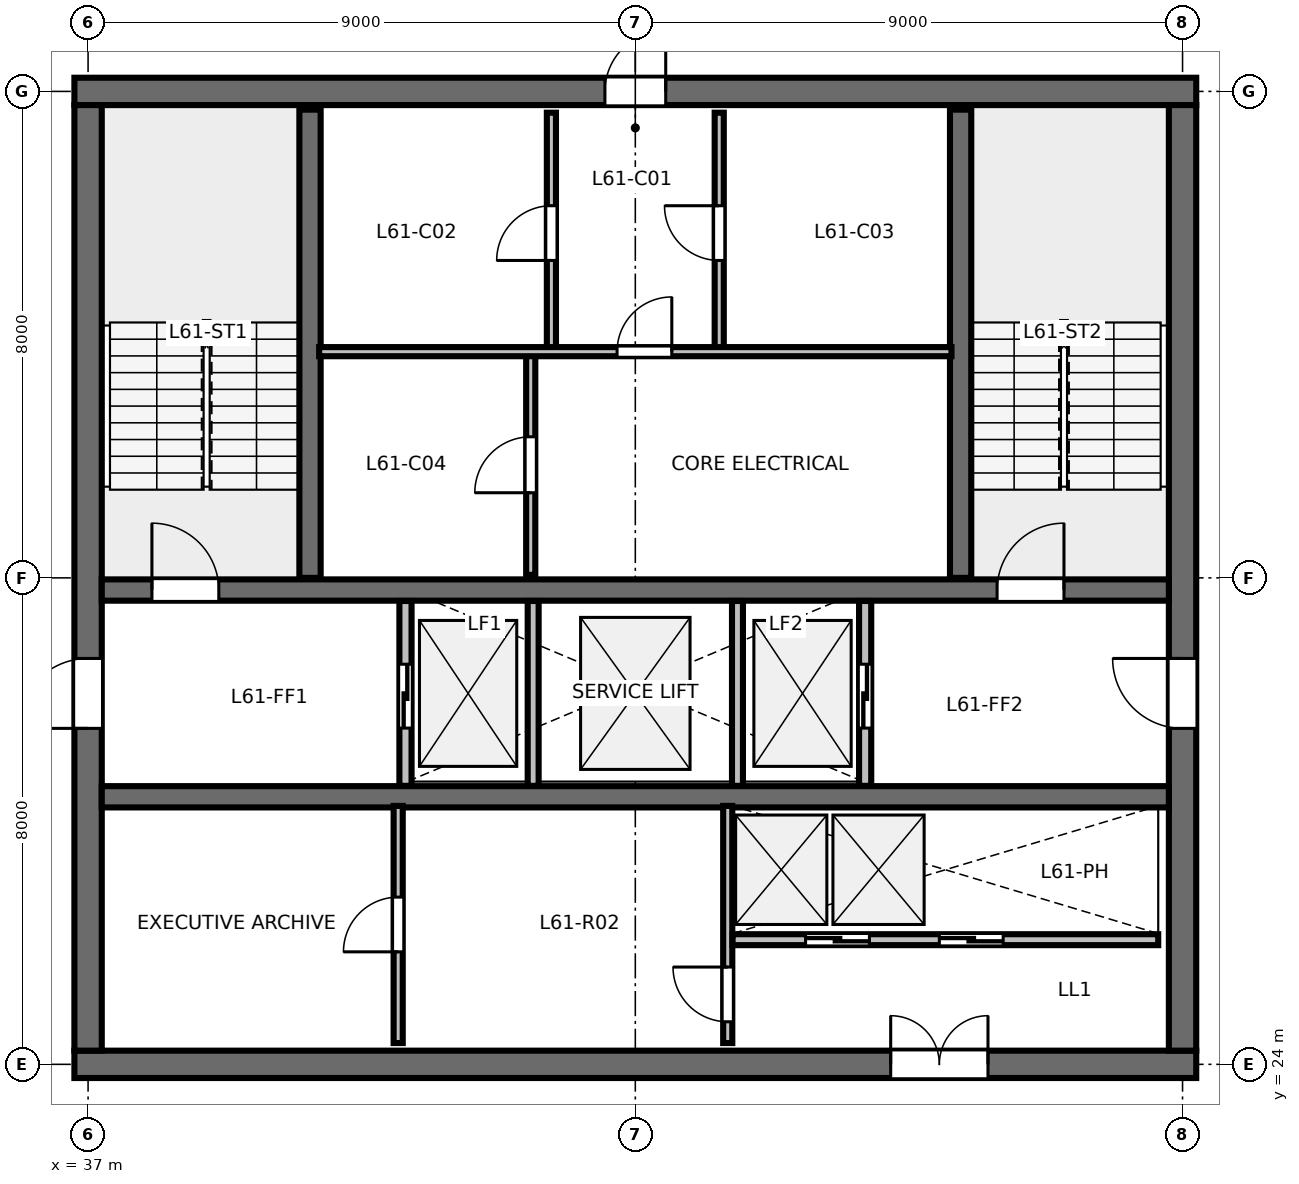
"""IFC4 building model, lengths in metres.
Left out: names, types, materials, properties, quantities, classifications, styles, units other than length and angle.
Written with IfcOpenShell. Run it as: python <this file> out.ifc"""

import sys

from ifc_helpers import new_model, si_unit, direction, frame, frame_2d, origin, place, context, subcontext, project, spatial, rectangle, extrude, element, fill, save


model = new_model("IFC4")
c1 = context("Model", 3, precision=1e-05, world=origin(), true_north=direction((0.0, 1.0)))
c2 = subcontext(c1, "Body", "Model", "MODEL_VIEW")
j1 = project(units=[si_unit("LENGTHUNIT", "METRE"), si_unit("PLANEANGLEUNIT", "RADIAN")], contexts=[c1])
p1 = place(None, origin())
s1 = spatial("IfcSite", under=j1, at=p1, CompositionType="ELEMENT")
p2 = place(p1, origin())
s2 = spatial("IfcBuilding", under=s1, at=p2, CompositionType="ELEMENT")
p3 = place(p2, frame((0.0, 0.0, 231.0)))
s3 = spatial("IfcBuildingStorey", under=s2, at=p3, CompositionType="ELEMENT", Elevation=231.0)
p4 = place(p3, frame((36.775, 24.0, 0.0), z_axis=(0.0, 0.0, 1.0), x_axis=(1.0, 0.0, 0.0)))
e1 = element("IfcWall", 1, at=p4, inside=s3, PredefinedType="SHEAR", context=c2, shape_type="SweptSolid", body=[
    extrude(rectangle(XDim=18.45, YDim=0.45, at=frame_2d((9.225, 0.0))), origin(), (0.0, 0.0, 1.0), 3.28),
])
p5 = place(p4, frame((13.425, 0.0, 0.0)))
e2 = element("IfcOpeningElement", 2, at=p5, cuts=e1, PredefinedType="OPENING", context=c2, shape_type="SweptSolid", body=[
    extrude(rectangle(XDim=1.6, YDim=2.15, at=frame_2d((0.8, 1.075))), frame((0.0, 0.235, 0.0), z_axis=(0.0, -1.0, 0.0), x_axis=(1.0, 0.0, 0.0)), (0.0, 0.0, 1.0), 0.47),
])
p6 = place(p3, frame((36.775, 40.0, 0.0), z_axis=(0.0, 0.0, 1.0), x_axis=(1.0, 0.0, 0.0)))
e3 = element("IfcWall", 3, at=p6, inside=s3, PredefinedType="SHEAR", context=c2, shape_type="SweptSolid", body=[
    extrude(rectangle(XDim=18.45, YDim=0.45, at=frame_2d((9.225, 0.0))), origin(), (0.0, 0.0, 1.0), 3.28),
])
p7 = place(p6, frame((8.725, 0.0, 0.0)))
e4 = element("IfcOpeningElement", 4, at=p7, cuts=e3, PredefinedType="OPENING", context=c2, shape_type="SweptSolid", body=[
    extrude(rectangle(XDim=1.0, YDim=2.15, at=frame_2d((0.5, 1.075))), frame((0.0, 0.235, 0.0), z_axis=(0.0, -1.0, 0.0), x_axis=(1.0, 0.0, 0.0)), (0.0, 0.0, 1.0), 0.47),
])
p8 = place(p3, frame((37.0, 24.225, 0.0), z_axis=(0.0, 0.0, 1.0), x_axis=(0.0, 1.0, 0.0)))
e5 = element("IfcWall", 5, at=p8, inside=s3, PredefinedType="SHEAR", context=c2, shape_type="SweptSolid", body=[
    extrude(rectangle(XDim=15.55, YDim=0.45, at=frame_2d((7.775, 0.0))), origin(), (0.0, 0.0, 1.0), 3.28),
])
p9 = place(p8, frame((5.3, 0.0, 0.0)))
e6 = element("IfcOpeningElement", 6, at=p9, cuts=e5, PredefinedType="OPENING", context=c2, shape_type="SweptSolid", body=[
    extrude(rectangle(XDim=1.15, YDim=2.15, at=frame_2d((0.575, 1.075))), frame((0.0, 0.235, 0.0), z_axis=(0.0, -1.0, 0.0), x_axis=(1.0, 0.0, 0.0)), (0.0, 0.0, 1.0), 0.47),
])
p10 = place(p3, frame((55.0, 24.225, 0.0), z_axis=(0.0, 0.0, 1.0), x_axis=(0.0, 1.0, 0.0)))
e7 = element("IfcWall", 7, at=p10, inside=s3, PredefinedType="SHEAR", context=c2, shape_type="SweptSolid", body=[
    extrude(rectangle(XDim=15.55, YDim=0.45, at=frame_2d((7.775, 0.0))), origin(), (0.0, 0.0, 1.0), 3.28),
])
p11 = place(p10, frame((5.3, 0.0, 0.0)))
e8 = element("IfcOpeningElement", 8, at=p11, cuts=e7, PredefinedType="OPENING", context=c2, shape_type="SweptSolid", body=[
    extrude(rectangle(XDim=1.15, YDim=2.15, at=frame_2d((0.575, 1.075))), frame((0.0, 0.235, 0.0), z_axis=(0.0, -1.0, 0.0), x_axis=(1.0, 0.0, 0.0)), (0.0, 0.0, 1.0), 0.47),
])
p12 = place(p3, frame((37.225, 31.8, 0.0), z_axis=(0.0, 0.0, 1.0), x_axis=(1.0, 0.0, 0.0)))
e9 = element("IfcWall", 9, at=p12, inside=s3, PredefinedType="SHEAR", context=c2, shape_type="SweptSolid", body=[
    extrude(rectangle(XDim=17.55, YDim=0.35, at=frame_2d((8.775, 0.0))), origin(), (0.0, 0.0, 1.0), 3.28),
])
p13 = place(p12, frame((0.825, 0.0, 0.0)))
e10 = element("IfcOpeningElement", 10, at=p13, cuts=e9, PredefinedType="OPENING", context=c2, shape_type="SweptSolid", body=[
    extrude(rectangle(XDim=1.1, YDim=2.15, at=frame_2d((0.55, 1.075))), frame((0.0, 0.185, 0.0), z_axis=(0.0, -1.0, 0.0), x_axis=(1.0, 0.0, 0.0)), (0.0, 0.0, 1.0), 0.37),
])
p14 = place(p12, frame((14.725, 0.0, 0.0)))
e11 = element("IfcOpeningElement", 11, at=p14, cuts=e9, PredefinedType="OPENING", context=c2, shape_type="SweptSolid", body=[
    extrude(rectangle(XDim=1.1, YDim=2.15, at=frame_2d((0.55, 1.075))), frame((0.0, 0.185, 0.0), z_axis=(0.0, -1.0, 0.0), x_axis=(1.0, 0.0, 0.0)), (0.0, 0.0, 1.0), 0.37),
])
p15 = place(p3, frame((37.225, 28.4, 0.0), z_axis=(0.0, 0.0, 1.0), x_axis=(1.0, 0.0, 0.0)))
e12 = element("IfcWall", 12, at=p15, inside=s3, PredefinedType="SHEAR", context=c2, shape_type="SweptSolid", body=[
    extrude(rectangle(XDim=17.55, YDim=0.35, at=frame_2d((8.775, 0.0))), origin(), (0.0, 0.0, 1.0), 3.28),
])
for number, where, z_axis, x_axis in (
    (13, (40.65, 32.0, 0.0), (0.0, 0.0, 1.0), (0.0, 1.0, 0.0)),
    (14, (51.35, 32.0, 0.0), (0.0, 0.0, 1.0), (0.0, 1.0, 0.0)),
):
    element("IfcWall", number, at=place(p3, frame(where, z_axis=z_axis, x_axis=x_axis)), inside=s3, PredefinedType="SHEAR", context=c2, shape_type="SweptSolid", body=[
        extrude(rectangle(XDim=7.7, YDim=0.35, at=frame_2d((3.85, 0.0))), origin(), (0.0, 0.0, 1.0), 3.6),
    ])
p16 = place(p3, frame((44.62, 35.72, 0.0), z_axis=(0.0, 0.0, 1.0), x_axis=(0.0, 1.0, 0.0)))
e15 = element("IfcWall", 15, at=p16, inside=s3, PredefinedType="PARTITIONING", context=c2, shape_type="SweptSolid", body=[
    extrude(rectangle(XDim=3.93, YDim=0.15, at=frame_2d((1.965, 0.0))), origin(), (0.0, 0.0, 1.0), 3.28),
])
p17 = place(p16, frame((1.5, 0.0, 0.0)))
e16 = element("IfcOpeningElement", 16, at=p17, cuts=e15, PredefinedType="OPENING", context=c2, shape_type="SweptSolid", body=[
    extrude(rectangle(XDim=0.9, YDim=2.15, at=frame_2d((0.45, 1.075))), frame((0.0, 0.085, 0.0), z_axis=(0.0, -1.0, 0.0), x_axis=(1.0, 0.0, 0.0)), (0.0, 0.0, 1.0), 0.17),
])
p18 = place(p3, frame((47.38, 35.72, 0.0), z_axis=(0.0, 0.0, 1.0), x_axis=(0.0, 1.0, 0.0)))
e17 = element("IfcWall", 17, at=p18, inside=s3, PredefinedType="PARTITIONING", context=c2, shape_type="SweptSolid", body=[
    extrude(rectangle(XDim=3.93, YDim=0.15, at=frame_2d((1.965, 0.0))), origin(), (0.0, 0.0, 1.0), 3.28),
])
p19 = place(p18, frame((1.5, 0.0, 0.0)))
e18 = element("IfcOpeningElement", 18, at=p19, cuts=e17, PredefinedType="OPENING", context=c2, shape_type="SweptSolid", body=[
    extrude(rectangle(XDim=0.9, YDim=2.15, at=frame_2d((0.45, 1.075))), frame((0.0, 0.085, 0.0), z_axis=(0.0, -1.0, 0.0), x_axis=(1.0, 0.0, 0.0)), (0.0, 0.0, 1.0), 0.17),
])
p20 = place(p3, frame((44.28, 32.05, 0.0), z_axis=(0.0, 0.0, 1.0), x_axis=(0.0, 1.0, 0.0)))
e19 = element("IfcWall", 19, at=p20, inside=s3, PredefinedType="PARTITIONING", context=c2, shape_type="SweptSolid", body=[
    extrude(rectangle(XDim=3.67, YDim=0.15, at=frame_2d((1.835, 0.0))), origin(), (0.0, 0.0, 1.0), 3.28),
])
p21 = place(p20, frame((1.35, 0.0, 0.0)))
e20 = element("IfcOpeningElement", 20, at=p21, cuts=e19, PredefinedType="OPENING", context=c2, shape_type="SweptSolid", body=[
    extrude(rectangle(XDim=0.92, YDim=2.15, at=frame_2d((0.46, 1.075))), frame((0.0, 0.085, 0.0), z_axis=(0.0, -1.0, 0.0), x_axis=(1.0, 0.0, 0.0)), (0.0, 0.0, 1.0), 0.17),
])
p22 = place(p3, frame((40.8, 35.72, 0.0), z_axis=(0.0, 0.0, 1.0), x_axis=(1.0, 0.0, 0.0)))
e21 = element("IfcWall", 21, at=p22, inside=s3, PredefinedType="PARTITIONING", context=c2, shape_type="SweptSolid", body=[
    extrude(rectangle(XDim=10.4, YDim=0.15, at=frame_2d((5.2, 0.0))), origin(), (0.0, 0.0, 1.0), 3.28),
])
p23 = place(p22, frame((4.9, 0.0, 0.0)))
e22 = element("IfcOpeningElement", 22, at=p23, cuts=e21, PredefinedType="OPENING", context=c2, shape_type="SweptSolid", body=[
    extrude(rectangle(XDim=0.9, YDim=2.15, at=frame_2d((0.45, 1.075))), frame((0.0, 0.085, 0.0), z_axis=(0.0, -1.0, 0.0), x_axis=(1.0, 0.0, 0.0)), (0.0, 0.0, 1.0), 0.17),
])
p24 = place(p3, frame((42.22, 28.58, 0.0), z_axis=(0.0, 0.0, 1.0), x_axis=(0.0, 1.0, 0.0)))
e23 = element("IfcWall", 23, at=p24, inside=s3, PredefinedType="PARTITIONING", context=c2, shape_type="SweptSolid", body=[
    extrude(rectangle(XDim=3.04, YDim=0.2, at=frame_2d((1.52, 0.0))), origin(), (0.0, 0.0, 1.0), 3.28),
])
p25 = place(p24, frame((0.95, 0.0, 0.0)))
e24 = element("IfcOpeningElement", 24, at=p25, cuts=e23, PredefinedType="OPENING", context=c2, shape_type="SweptSolid", body=[
    extrude(rectangle(XDim=1.05, YDim=2.15, at=frame_2d((0.525, 1.075))), frame((0.0, 0.11, 0.0), z_axis=(0.0, -1.0, 0.0), x_axis=(1.0, 0.0, 0.0)), (0.0, 0.0, 1.0), 0.22),
])
p26 = place(p3, frame((49.78, 28.58, 0.0), z_axis=(0.0, 0.0, 1.0), x_axis=(0.0, 1.0, 0.0)))
e25 = element("IfcWall", 25, at=p26, inside=s3, PredefinedType="PARTITIONING", context=c2, shape_type="SweptSolid", body=[
    extrude(rectangle(XDim=3.04, YDim=0.2, at=frame_2d((1.52, 0.0))), origin(), (0.0, 0.0, 1.0), 3.28),
])
p27 = place(p26, frame((0.95, 0.0, 0.0)))
e26 = element("IfcOpeningElement", 26, at=p27, cuts=e25, PredefinedType="OPENING", context=c2, shape_type="SweptSolid", body=[
    extrude(rectangle(XDim=1.05, YDim=2.15, at=frame_2d((0.525, 1.075))), frame((0.0, 0.11, 0.0), z_axis=(0.0, -1.0, 0.0), x_axis=(1.0, 0.0, 0.0)), (0.0, 0.0, 1.0), 0.22),
])
for number, where, z_axis, x_axis in (
    (27, (44.32, 28.58, 0.0), (0.0, 0.0, 1.0), (0.0, 1.0, 0.0)),
    (28, (47.68, 28.58, 0.0), (0.0, 0.0, 1.0), (0.0, 1.0, 0.0)),
):
    element("IfcWall", number, at=place(p3, frame(where, z_axis=z_axis, x_axis=x_axis)), inside=s3, PredefinedType="PARTITIONING", context=c2, shape_type="SweptSolid", body=[
        extrude(rectangle(XDim=3.04, YDim=0.18, at=frame_2d((1.52, 0.0))), origin(), (0.0, 0.0, 1.0), 3.28),
    ])
p28 = place(p3, frame((42.1, 24.35, 0.0), z_axis=(0.0, 0.0, 1.0), x_axis=(0.0, 1.0, 0.0)))
e29 = element("IfcWall", 29, at=p28, inside=s3, PredefinedType="PARTITIONING", context=c2, shape_type="SweptSolid", body=[
    extrude(rectangle(XDim=3.9, YDim=0.15, at=frame_2d((1.95, 0.0))), origin(), (0.0, 0.0, 1.0), 3.28),
])
p29 = place(p28, frame((1.5, 0.0, 0.0)))
e30 = element("IfcOpeningElement", 30, at=p29, cuts=e29, PredefinedType="OPENING", context=c2, shape_type="SweptSolid", body=[
    extrude(rectangle(XDim=0.9, YDim=2.15, at=frame_2d((0.45, 1.075))), frame((0.0, 0.085, 0.0), z_axis=(0.0, -1.0, 0.0), x_axis=(1.0, 0.0, 0.0)), (0.0, 0.0, 1.0), 0.17),
])
p30 = place(p3, frame((47.52, 24.35, 0.0), z_axis=(0.0, 0.0, 1.0), x_axis=(0.0, 1.0, 0.0)))
e31 = element("IfcWall", 31, at=p30, inside=s3, PredefinedType="PARTITIONING", context=c2, shape_type="SweptSolid", body=[
    extrude(rectangle(XDim=3.9, YDim=0.15, at=frame_2d((1.95, 0.0))), origin(), (0.0, 0.0, 1.0), 3.28),
])
p31 = place(p30, frame((0.35, 0.0, 0.0)))
e32 = element("IfcOpeningElement", 32, at=p31, cuts=e31, PredefinedType="OPENING", context=c2, shape_type="SweptSolid", body=[
    extrude(rectangle(XDim=0.9, YDim=2.15, at=frame_2d((0.45, 1.075))), frame((0.0, 0.085, 0.0), z_axis=(0.0, -1.0, 0.0), x_axis=(1.0, 0.0, 0.0)), (0.0, 0.0, 1.0), 0.17),
])
p32 = place(p3, frame((47.6, 26.05, 0.0), z_axis=(0.0, 0.0, 1.0), x_axis=(1.0, 0.0, 0.0)))
e33 = element("IfcWall", 33, at=p32, inside=s3, PredefinedType="PARTITIONING", context=c2, shape_type="SweptSolid", body=[
    extrude(rectangle(XDim=7.0, YDim=0.18, at=frame_2d((3.5, 0.0))), origin(), (0.0, 0.0, 1.0), 3.28),
])
p33 = place(p32, frame((1.2, 0.0, 0.0)))
e34 = element("IfcOpeningElement", 34, at=p33, cuts=e33, PredefinedType="OPENING", context=c2, shape_type="SweptSolid", body=[
    extrude(rectangle(XDim=1.05, YDim=2.15, at=frame_2d((0.525, 1.075))), frame((0.0, 0.1, 0.0), z_axis=(0.0, -1.0, 0.0), x_axis=(1.0, 0.0, 0.0)), (0.0, 0.0, 1.0), 0.2),
])
p34 = place(p32, frame((3.4, 0.0, 0.0)))
e35 = element("IfcOpeningElement", 35, at=p34, cuts=e33, PredefinedType="OPENING", context=c2, shape_type="SweptSolid", body=[
    extrude(rectangle(XDim=1.05, YDim=2.15, at=frame_2d((0.525, 1.075))), frame((0.0, 0.1, 0.0), z_axis=(0.0, -1.0, 0.0), x_axis=(1.0, 0.0, 0.0)), (0.0, 0.0, 1.0), 0.2),
])
p35 = place(p13, origin())
e36 = element("IfcDoor", 36, at=p35, inside=s3, OperationType="SINGLE_SWING_LEFT", PredefinedType="DOOR", context=c2, shape_type="SweptSolid", body=[
    extrude(rectangle(XDim=1.1, YDim=2.15, at=frame_2d((0.55, 1.075))), frame((0.0, 0.025, 0.0), z_axis=(0.0, -1.0, 0.0), x_axis=(1.0, 0.0, 0.0)), (0.0, 0.0, 1.0), 0.05),
])
fill(e10, e36)
p36 = place(p14, origin())
e37 = element("IfcDoor", 37, at=p36, inside=s3, OperationType="SINGLE_SWING_RIGHT", PredefinedType="DOOR", context=c2, shape_type="SweptSolid", body=[
    extrude(rectangle(XDim=1.1, YDim=2.15, at=frame_2d((0.55, 1.075))), frame((0.0, 0.025, 0.0), z_axis=(0.0, -1.0, 0.0), x_axis=(1.0, 0.0, 0.0)), (0.0, 0.0, 1.0), 0.05),
])
fill(e11, e37)
p37 = place(p7, origin())
e38 = element("IfcDoor", 38, at=p37, inside=s3, OperationType="SINGLE_SWING_RIGHT", PredefinedType="DOOR", context=c2, shape_type="SweptSolid", body=[
    extrude(rectangle(XDim=1.0, YDim=2.15, at=frame_2d((0.5, 1.075))), frame((0.0, 0.025, 0.0), z_axis=(0.0, -1.0, 0.0), x_axis=(1.0, 0.0, 0.0)), (0.0, 0.0, 1.0), 0.05),
])
fill(e4, e38)
p38 = place(p9, origin())
e39 = element("IfcDoor", 39, at=p38, inside=s3, OperationType="SINGLE_SWING_LEFT", PredefinedType="DOOR", context=c2, shape_type="SweptSolid", body=[
    extrude(rectangle(XDim=1.15, YDim=2.15, at=frame_2d((0.575, 1.075))), frame((0.0, 0.025, 0.0), z_axis=(0.0, -1.0, 0.0), x_axis=(1.0, 0.0, 0.0)), (0.0, 0.0, 1.0), 0.05),
])
fill(e6, e39)
p39 = place(p11, origin())
e40 = element("IfcDoor", 40, at=p39, inside=s3, OperationType="SINGLE_SWING_RIGHT", PredefinedType="DOOR", context=c2, shape_type="SweptSolid", body=[
    extrude(rectangle(XDim=1.15, YDim=2.15, at=frame_2d((0.575, 1.075))), frame((0.0, 0.025, 0.0), z_axis=(0.0, -1.0, 0.0), x_axis=(1.0, 0.0, 0.0)), (0.0, 0.0, 1.0), 0.05),
])
fill(e8, e40)
p40 = place(p5, origin())
e41 = element("IfcDoor", 41, at=p40, inside=s3, OperationType="DOUBLE_DOOR_SINGLE_SWING", PredefinedType="DOOR", context=c2, shape_type="SweptSolid", body=[
    extrude(rectangle(XDim=1.6, YDim=2.15, at=frame_2d((0.8, 1.075))), frame((0.0, 0.025, 0.0), z_axis=(0.0, -1.0, 0.0), x_axis=(1.0, 0.0, 0.0)), (0.0, 0.0, 1.0), 0.05),
])
fill(e2, e41)
p41 = place(p17, origin())
e42 = element("IfcDoor", 42, at=p41, inside=s3, OperationType="SINGLE_SWING_LEFT", PredefinedType="DOOR", context=c2, shape_type="SweptSolid", body=[
    extrude(rectangle(XDim=0.9, YDim=2.15, at=frame_2d((0.45, 1.075))), frame((0.0, 0.025, 0.0), z_axis=(0.0, -1.0, 0.0), x_axis=(1.0, 0.0, 0.0)), (0.0, 0.0, 1.0), 0.05),
])
fill(e16, e42)
p42 = place(p19, origin())
e43 = element("IfcDoor", 43, at=p42, inside=s3, OperationType="SINGLE_SWING_RIGHT", PredefinedType="DOOR", context=c2, shape_type="SweptSolid", body=[
    extrude(rectangle(XDim=0.9, YDim=2.15, at=frame_2d((0.45, 1.075))), frame((0.0, 0.025, 0.0), z_axis=(0.0, -1.0, 0.0), x_axis=(1.0, 0.0, 0.0)), (0.0, 0.0, 1.0), 0.05),
])
fill(e18, e43)
p43 = place(p21, origin())
e44 = element("IfcDoor", 44, at=p43, inside=s3, OperationType="SINGLE_SWING_LEFT", PredefinedType="DOOR", context=c2, shape_type="SweptSolid", body=[
    extrude(rectangle(XDim=0.92, YDim=2.15, at=frame_2d((0.46, 1.075))), frame((0.0, 0.025, 0.0), z_axis=(0.0, -1.0, 0.0), x_axis=(1.0, 0.0, 0.0)), (0.0, 0.0, 1.0), 0.05),
])
fill(e20, e44)
p44 = place(p23, origin())
e45 = element("IfcDoor", 45, at=p44, inside=s3, OperationType="SINGLE_SWING_RIGHT", PredefinedType="DOOR", context=c2, shape_type="SweptSolid", body=[
    extrude(rectangle(XDim=0.9, YDim=2.15, at=frame_2d((0.45, 1.075))), frame((0.0, 0.025, 0.0), z_axis=(0.0, -1.0, 0.0), x_axis=(1.0, 0.0, 0.0)), (0.0, 0.0, 1.0), 0.05),
])
fill(e22, e45)
p45 = place(p25, origin())
e46 = element("IfcDoor", 46, at=p45, inside=s3, OperationType="SLIDING_TO_LEFT", PredefinedType="DOOR", context=c2, shape_type="SweptSolid", body=[
    extrude(rectangle(XDim=1.05, YDim=2.15, at=frame_2d((0.525, 1.075))), frame((0.0, 0.025, 0.0), z_axis=(0.0, -1.0, 0.0), x_axis=(1.0, 0.0, 0.0)), (0.0, 0.0, 1.0), 0.05),
])
fill(e24, e46)
p46 = place(p27, origin())
e47 = element("IfcDoor", 47, at=p46, inside=s3, OperationType="SLIDING_TO_RIGHT", PredefinedType="DOOR", context=c2, shape_type="SweptSolid", body=[
    extrude(rectangle(XDim=1.05, YDim=2.15, at=frame_2d((0.525, 1.075))), frame((0.0, 0.025, 0.0), z_axis=(0.0, -1.0, 0.0), x_axis=(1.0, 0.0, 0.0)), (0.0, 0.0, 1.0), 0.05),
])
fill(e26, e47)
p47 = place(p29, origin())
e48 = element("IfcDoor", 48, at=p47, inside=s3, OperationType="SINGLE_SWING_LEFT", PredefinedType="DOOR", context=c2, shape_type="SweptSolid", body=[
    extrude(rectangle(XDim=0.9, YDim=2.15, at=frame_2d((0.45, 1.075))), frame((0.0, 0.025, 0.0), z_axis=(0.0, -1.0, 0.0), x_axis=(1.0, 0.0, 0.0)), (0.0, 0.0, 1.0), 0.05),
])
fill(e30, e48)
p48 = place(p31, origin())
e49 = element("IfcDoor", 49, at=p48, inside=s3, OperationType="SINGLE_SWING_RIGHT", PredefinedType="DOOR", context=c2, shape_type="SweptSolid", body=[
    extrude(rectangle(XDim=0.9, YDim=2.15, at=frame_2d((0.45, 1.075))), frame((0.0, 0.025, 0.0), z_axis=(0.0, -1.0, 0.0), x_axis=(1.0, 0.0, 0.0)), (0.0, 0.0, 1.0), 0.05),
])
fill(e32, e49)
p49 = place(p33, origin())
e50 = element("IfcDoor", 50, at=p49, inside=s3, OperationType="SLIDING_TO_LEFT", PredefinedType="DOOR", context=c2, shape_type="SweptSolid", body=[
    extrude(rectangle(XDim=1.05, YDim=2.15, at=frame_2d((0.525, 1.075))), frame((0.0, 0.025, 0.0), z_axis=(0.0, -1.0, 0.0), x_axis=(1.0, 0.0, 0.0)), (0.0, 0.0, 1.0), 0.05),
])
fill(e34, e50)
p50 = place(p34, origin())
e51 = element("IfcDoor", 51, at=p50, inside=s3, OperationType="SLIDING_TO_RIGHT", PredefinedType="DOOR", context=c2, shape_type="SweptSolid", body=[
    extrude(rectangle(XDim=1.05, YDim=2.15, at=frame_2d((0.525, 1.075))), frame((0.0, 0.025, 0.0), z_axis=(0.0, -1.0, 0.0), x_axis=(1.0, 0.0, 0.0)), (0.0, 0.0, 1.0), 0.05),
])
fill(e35, e51)
save(model, sys.argv[1])
